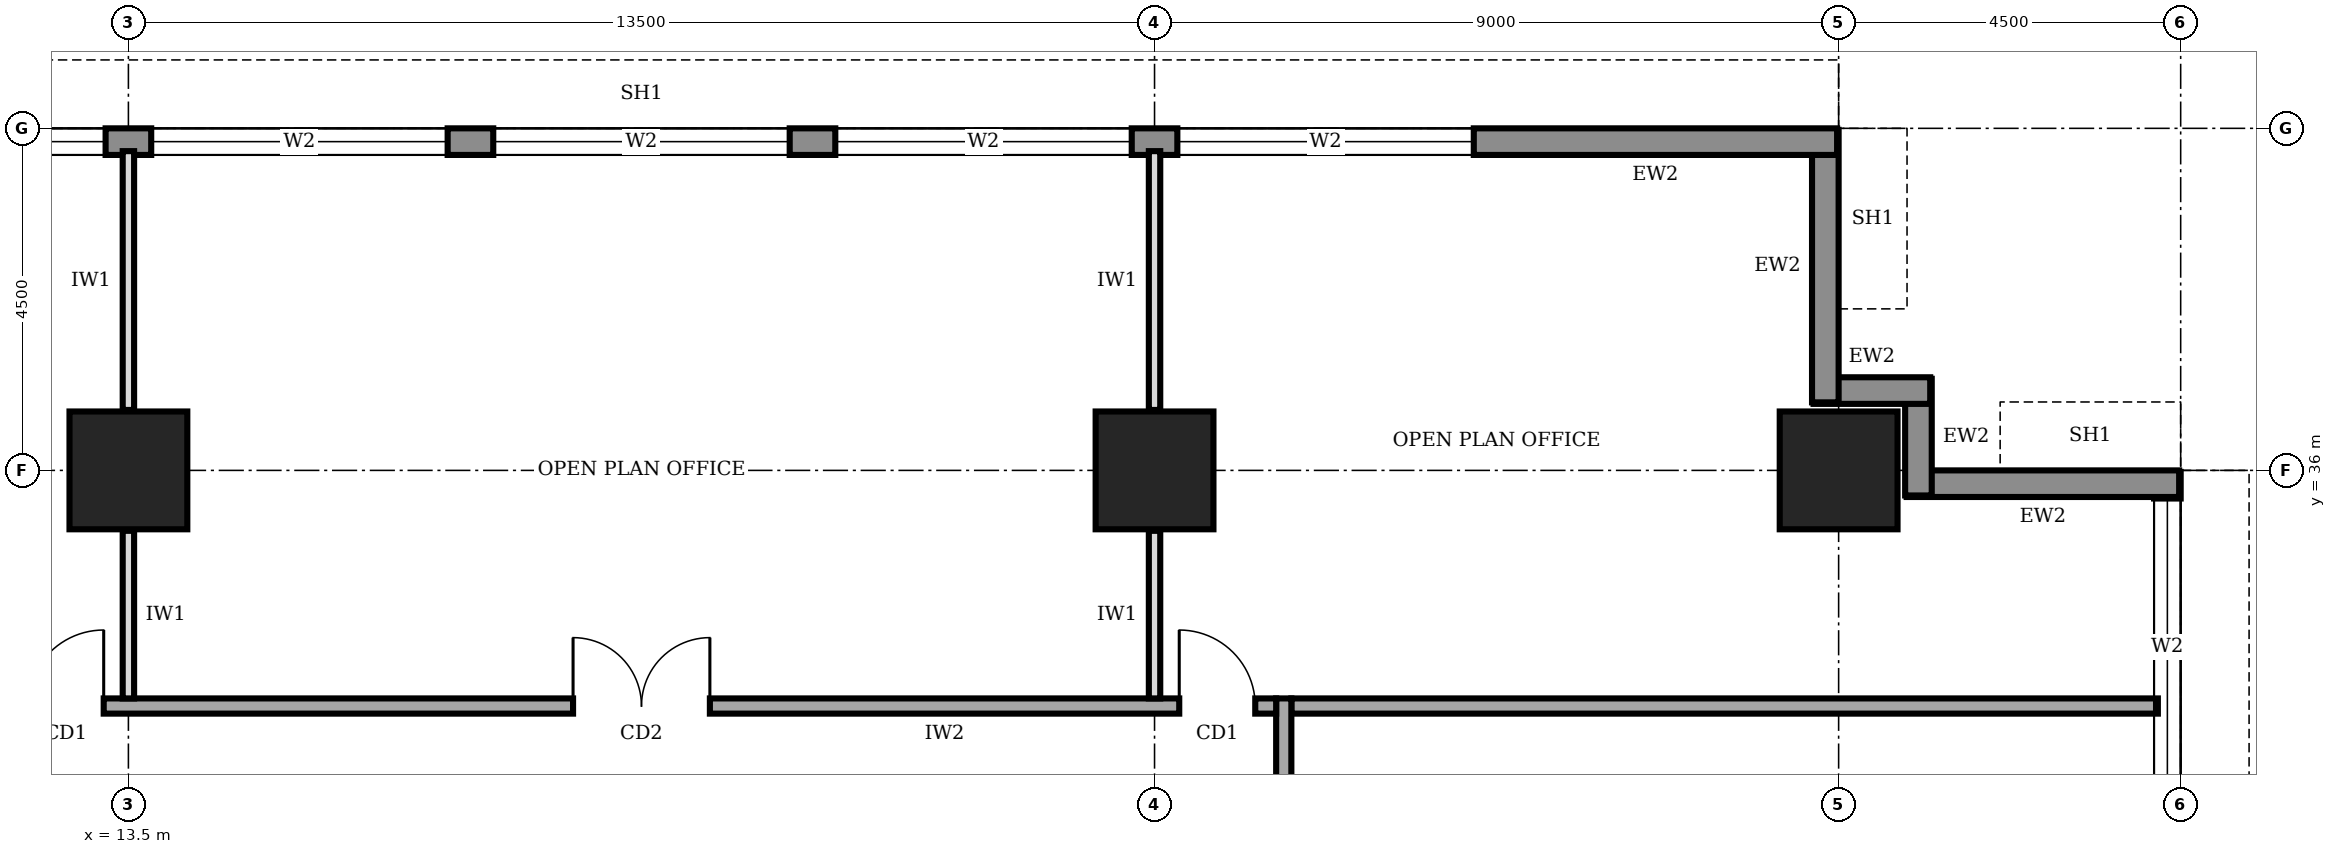
"""IFC4 building model, lengths in metres.
Left out: names, types, materials, properties, quantities, classifications, styles, units other than length and angle.
Written with IfcOpenShell. Run it as: python <this file> out.ifc"""

import sys

from ifc_helpers import new_model, si_unit, direction, frame, frame_2d, origin, origin_2d, place, context, subcontext, project, spatial, rectangle, extrude, element, fill, save


model = new_model("IFC4")
c1 = context("Model", 3, precision=1e-05, world=origin(), true_north=direction((0.0, 1.0)))
c2 = subcontext(c1, "Body", "Model", "MODEL_VIEW")
j1 = project(units=[si_unit("LENGTHUNIT", "METRE"), si_unit("PLANEANGLEUNIT", "RADIAN")], contexts=[c1])
p1 = place(None, origin())
s1 = spatial("IfcSite", under=j1, at=p1, CompositionType="ELEMENT")
p2 = place(p1, origin())
s2 = spatial("IfcBuilding", under=s1, at=p2, CompositionType="ELEMENT")
p3 = place(p2, frame((0.0, 0.0, 241.0)))
s3 = spatial("IfcBuildingStorey", under=s2, at=p3, CompositionType="ELEMENT", Elevation=241.0)
for number, where, z_axis, x_axis in (
    (1, (13.5, 36.0, 0.0), (0.0, 0.0, 1.0), (1.0, 0.0, 0.0)),
    (2, (27.0, 36.0, 0.0), (0.0, 0.0, 1.0), (1.0, 0.0, 0.0)),
    (3, (36.0, 36.0, 0.0), (0.0, 0.0, 1.0), (1.0, 0.0, 0.0)),
):
    element("IfcColumn", number, at=place(p3, frame(where, z_axis=z_axis, x_axis=x_axis)), inside=s3, PredefinedType="COLUMN", context=c2, shape_type="SweptSolid", body=[
        extrude(rectangle(XDim=1.55, YDim=1.55, at=origin_2d()), origin(), (0.0, 0.0, 1.0), 4.0),
    ])
p4 = place(p3, frame((40.325, 4.52, 0.0), z_axis=(0.0, 0.0, 1.0), x_axis=(0.0, 1.0, 0.0)))
e4 = element("IfcWall", 4, at=p4, inside=s3, PredefinedType="STANDARD", context=c2, shape_type="SweptSolid", body=[
    extrude(rectangle(XDim=31.46, YDim=0.35, at=frame_2d((15.73, 0.0))), origin(), (0.0, 0.0, 1.0), 3.75),
])
p5 = place(p4, frame((4.78, 0.0, 0.6)))
e5 = element("IfcOpeningElement", 5, at=p5, cuts=e4, PredefinedType="OPENING", context=c2, shape_type="SweptSolid", body=[
    extrude(rectangle(XDim=3.9, YDim=2.6, at=frame_2d((1.95, 1.3))), frame((0.0, 0.185, 0.0), z_axis=(0.0, -1.0, 0.0), x_axis=(1.0, 0.0, 0.0)), (0.0, 0.0, 1.0), 0.37),
])
p6 = place(p4, frame((9.28, 0.0, 0.6)))
e6 = element("IfcOpeningElement", 6, at=p6, cuts=e4, PredefinedType="OPENING", context=c2, shape_type="SweptSolid", body=[
    extrude(rectangle(XDim=3.9, YDim=2.6, at=frame_2d((1.95, 1.3))), frame((0.0, 0.185, 0.0), z_axis=(0.0, -1.0, 0.0), x_axis=(1.0, 0.0, 0.0)), (0.0, 0.0, 1.0), 0.37),
])
p7 = place(p4, frame((13.78, 0.0, 0.6)))
e7 = element("IfcOpeningElement", 7, at=p7, cuts=e4, PredefinedType="OPENING", context=c2, shape_type="SweptSolid", body=[
    extrude(rectangle(XDim=3.9, YDim=2.6, at=frame_2d((1.95, 1.3))), frame((0.0, 0.185, 0.0), z_axis=(0.0, -1.0, 0.0), x_axis=(1.0, 0.0, 0.0)), (0.0, 0.0, 1.0), 0.37),
])
p8 = place(p4, frame((18.28, 0.0, 0.6)))
e8 = element("IfcOpeningElement", 8, at=p8, cuts=e4, PredefinedType="OPENING", context=c2, shape_type="SweptSolid", body=[
    extrude(rectangle(XDim=3.9, YDim=2.6, at=frame_2d((1.95, 1.3))), frame((0.0, 0.185, 0.0), z_axis=(0.0, -1.0, 0.0), x_axis=(1.0, 0.0, 0.0)), (0.0, 0.0, 1.0), 0.37),
])
p9 = place(p4, frame((22.78, 0.0, 0.6)))
e9 = element("IfcOpeningElement", 9, at=p9, cuts=e4, PredefinedType="OPENING", context=c2, shape_type="SweptSolid", body=[
    extrude(rectangle(XDim=3.9, YDim=2.6, at=frame_2d((1.95, 1.3))), frame((0.0, 0.185, 0.0), z_axis=(0.0, -1.0, 0.0), x_axis=(1.0, 0.0, 0.0)), (0.0, 0.0, 1.0), 0.37),
])
p10 = place(p4, frame((27.21, 0.0, 0.6)))
e10 = element("IfcOpeningElement", 10, at=p10, cuts=e4, PredefinedType="OPENING", context=c2, shape_type="SweptSolid", body=[
    extrude(rectangle(XDim=3.9, YDim=2.6, at=frame_2d((1.95, 1.3))), frame((0.0, 0.185, 0.0), z_axis=(0.0, -1.0, 0.0), x_axis=(1.0, 0.0, 0.0)), (0.0, 0.0, 1.0), 0.37),
])
p11 = place(p3, frame((40.48, 35.825, 0.0), z_axis=(0.0, 0.0, 1.0), x_axis=(-1.0, 0.0, 0.0)))
e11 = element("IfcWall", 11, at=p11, inside=s3, PredefinedType="STANDARD", context=c2, shape_type="SweptSolid", body=[
    extrude(rectangle(XDim=3.585, YDim=0.35, at=frame_2d((1.792, 0.0))), origin(), (0.0, 0.0, 1.0), 2.75),
])
for number, where, z_axis, x_axis in (
    (12, (37.05, 35.67, 0.0), (0.0, 0.0, 1.0), (0.0, 1.0, 0.0)),
    (13, (37.205, 37.05, 0.0), (0.0, 0.0, 1.0), (-1.0, 0.0, 0.0)),
):
    element("IfcWall", number, at=place(p3, frame(where, z_axis=z_axis, x_axis=x_axis)), inside=s3, PredefinedType="STANDARD", context=c2, shape_type="SweptSolid", body=[
        extrude(rectangle(XDim=1.535, YDim=0.35, at=frame_2d((0.768, 0.0))), origin(), (0.0, 0.0, 1.0), 3.75),
    ])
p12 = place(p3, frame((35.825, 36.895, 0.0), z_axis=(0.0, 0.0, 1.0), x_axis=(0.0, 1.0, 0.0)))
e14 = element("IfcWall", 14, at=p12, inside=s3, PredefinedType="STANDARD", context=c2, shape_type="SweptSolid", body=[
    extrude(rectangle(XDim=3.585, YDim=0.35, at=frame_2d((1.792, 0.0))), origin(), (0.0, 0.0, 1.0), 2.75),
])
p13 = place(p3, frame((35.98, 40.325, 0.0), z_axis=(0.0, 0.0, 1.0), x_axis=(-1.0, 0.0, 0.0)))
e15 = element("IfcWall", 15, at=p13, inside=s3, PredefinedType="STANDARD", context=c2, shape_type="SweptSolid", body=[
    extrude(rectangle(XDim=31.46, YDim=0.35, at=frame_2d((15.73, 0.0))), origin(), (0.0, 0.0, 1.0), 3.75),
])
p14 = place(p13, frame((27.21, 0.0, 0.6)))
e16 = element("IfcOpeningElement", 16, at=p14, cuts=e15, PredefinedType="OPENING", context=c2, shape_type="SweptSolid", body=[
    extrude(rectangle(XDim=3.9, YDim=2.6, at=frame_2d((1.95, 1.3))), frame((0.0, 0.185, 0.0), z_axis=(0.0, -1.0, 0.0), x_axis=(1.0, 0.0, 0.0)), (0.0, 0.0, 1.0), 0.37),
])
p15 = place(p13, frame((22.78, 0.0, 0.6)))
e17 = element("IfcOpeningElement", 17, at=p15, cuts=e15, PredefinedType="OPENING", context=c2, shape_type="SweptSolid", body=[
    extrude(rectangle(XDim=3.9, YDim=2.6, at=frame_2d((1.95, 1.3))), frame((0.0, 0.185, 0.0), z_axis=(0.0, -1.0, 0.0), x_axis=(1.0, 0.0, 0.0)), (0.0, 0.0, 1.0), 0.37),
])
p16 = place(p13, frame((18.28, 0.0, 0.6)))
e18 = element("IfcOpeningElement", 18, at=p16, cuts=e15, PredefinedType="OPENING", context=c2, shape_type="SweptSolid", body=[
    extrude(rectangle(XDim=3.9, YDim=2.6, at=frame_2d((1.95, 1.3))), frame((0.0, 0.185, 0.0), z_axis=(0.0, -1.0, 0.0), x_axis=(1.0, 0.0, 0.0)), (0.0, 0.0, 1.0), 0.37),
])
p17 = place(p13, frame((13.78, 0.0, 0.6)))
e19 = element("IfcOpeningElement", 19, at=p17, cuts=e15, PredefinedType="OPENING", context=c2, shape_type="SweptSolid", body=[
    extrude(rectangle(XDim=3.9, YDim=2.6, at=frame_2d((1.95, 1.3))), frame((0.0, 0.185, 0.0), z_axis=(0.0, -1.0, 0.0), x_axis=(1.0, 0.0, 0.0)), (0.0, 0.0, 1.0), 0.37),
])
p18 = place(p13, frame((9.28, 0.0, 0.6)))
e20 = element("IfcOpeningElement", 20, at=p18, cuts=e15, PredefinedType="OPENING", context=c2, shape_type="SweptSolid", body=[
    extrude(rectangle(XDim=3.9, YDim=2.6, at=frame_2d((1.95, 1.3))), frame((0.0, 0.185, 0.0), z_axis=(0.0, -1.0, 0.0), x_axis=(1.0, 0.0, 0.0)), (0.0, 0.0, 1.0), 0.37),
])
p19 = place(p13, frame((4.78, 0.0, 0.6)))
e21 = element("IfcOpeningElement", 21, at=p19, cuts=e15, PredefinedType="OPENING", context=c2, shape_type="SweptSolid", body=[
    extrude(rectangle(XDim=3.9, YDim=2.6, at=frame_2d((1.95, 1.3))), frame((0.0, 0.185, 0.0), z_axis=(0.0, -1.0, 0.0), x_axis=(1.0, 0.0, 0.0)), (0.0, 0.0, 1.0), 0.37),
])
p20 = place(p3, frame((28.7, 7.7, 0.0), z_axis=(0.0, 0.0, 1.0), x_axis=(0.0, 1.0, 0.0)))
e22 = element("IfcWall", 22, at=p20, inside=s3, PredefinedType="SOLIDWALL", context=c2, shape_type="SweptSolid", body=[
    extrude(rectangle(XDim=25.3, YDim=0.2, at=frame_2d((12.65, 0.0))), origin(), (0.0, 0.0, 1.0), 3.75),
])
p21 = place(p20, frame((2.3, 0.0, 0.0)))
e23 = element("IfcOpeningElement", 23, at=p21, cuts=e22, PredefinedType="OPENING", context=c2, shape_type="SweptSolid", body=[
    extrude(rectangle(XDim=1.0, YDim=2.1, at=frame_2d((0.5, 1.05))), frame((0.0, 0.11, 0.0), z_axis=(0.0, -1.0, 0.0), x_axis=(1.0, 0.0, 0.0)), (0.0, 0.0, 1.0), 0.22),
])
p22 = place(p20, frame((7.55, 0.0, 0.0)))
e24 = element("IfcOpeningElement", 24, at=p22, cuts=e22, PredefinedType="OPENING", context=c2, shape_type="SweptSolid", body=[
    extrude(rectangle(XDim=1.0, YDim=2.1, at=frame_2d((0.5, 1.05))), frame((0.0, 0.11, 0.0), z_axis=(0.0, -1.0, 0.0), x_axis=(1.0, 0.0, 0.0)), (0.0, 0.0, 1.0), 0.22),
])
p23 = place(p20, frame((16.9, 0.0, 0.0)))
e25 = element("IfcOpeningElement", 25, at=p23, cuts=e22, PredefinedType="OPENING", context=c2, shape_type="SweptSolid", body=[
    extrude(rectangle(XDim=1.8, YDim=2.1, at=frame_2d((0.9, 1.05))), frame((0.0, 0.11, 0.0), z_axis=(0.0, -1.0, 0.0), x_axis=(1.0, 0.0, 0.0)), (0.0, 0.0, 1.0), 0.22),
])
p24 = place(p3, frame((28.6, 32.9, 0.0), z_axis=(0.0, 0.0, 1.0), x_axis=(-1.0, 0.0, 0.0)))
e26 = element("IfcWall", 26, at=p24, inside=s3, PredefinedType="SOLIDWALL", context=c2, shape_type="SweptSolid", body=[
    extrude(rectangle(XDim=16.9, YDim=0.2, at=frame_2d((8.45, 0.0))), origin(), (0.0, 0.0, 1.0), 3.75),
])
p25 = place(p24, frame((15.425, 0.0, 0.0)))
e27 = element("IfcOpeningElement", 27, at=p25, cuts=e26, PredefinedType="OPENING", context=c2, shape_type="SweptSolid", body=[
    extrude(rectangle(XDim=1.0, YDim=2.1, at=frame_2d((0.5, 1.05))), frame((0.0, 0.11, 0.0), z_axis=(0.0, -1.0, 0.0), x_axis=(1.0, 0.0, 0.0)), (0.0, 0.0, 1.0), 0.22),
])
p26 = place(p24, frame((7.45, 0.0, 0.0)))
e28 = element("IfcOpeningElement", 28, at=p26, cuts=e26, PredefinedType="OPENING", context=c2, shape_type="SweptSolid", body=[
    extrude(rectangle(XDim=1.8, YDim=2.1, at=frame_2d((0.9, 1.05))), frame((0.0, 0.11, 0.0), z_axis=(0.0, -1.0, 0.0), x_axis=(1.0, 0.0, 0.0)), (0.0, 0.0, 1.0), 0.22),
])
p27 = place(p24, frame((0.275, 0.0, 0.0)))
e29 = element("IfcOpeningElement", 29, at=p27, cuts=e26, PredefinedType="OPENING", context=c2, shape_type="SweptSolid", body=[
    extrude(rectangle(XDim=1.0, YDim=2.1, at=frame_2d((0.5, 1.05))), frame((0.0, 0.11, 0.0), z_axis=(0.0, -1.0, 0.0), x_axis=(1.0, 0.0, 0.0)), (0.0, 0.0, 1.0), 0.22),
])
p28 = place(p3, frame((28.8, 32.9, 0.0), z_axis=(0.0, 0.0, 1.0), x_axis=(1.0, 0.0, 0.0)))
e30 = element("IfcWall", 30, at=p28, inside=s3, PredefinedType="SOLIDWALL", context=c2, shape_type="SweptSolid", body=[
    extrude(rectangle(XDim=11.4, YDim=0.2, at=frame_2d((5.7, 0.0))), origin(), (0.0, 0.0, 1.0), 3.75),
])
p29 = place(p3, frame((13.5, 33.0, 0.0), z_axis=(0.0, 0.0, 1.0), x_axis=(0.0, 1.0, 0.0)))
e31 = element("IfcWall", 31, at=p29, inside=s3, PredefinedType="PARTITIONING", context=c2, shape_type="SweptSolid", body=[
    extrude(rectangle(XDim=2.205, YDim=0.15, at=frame_2d((1.103, 0.0))), origin(), (0.0, 0.0, 1.0), 3.75),
])
p30 = place(p3, frame((13.5, 36.795, 0.0), z_axis=(0.0, 0.0, 1.0), x_axis=(0.0, 1.0, 0.0)))
e32 = element("IfcWall", 32, at=p30, inside=s3, PredefinedType="PARTITIONING", context=c2, shape_type="SweptSolid", body=[
    extrude(rectangle(XDim=3.405, YDim=0.15, at=frame_2d((1.703, 0.0))), origin(), (0.0, 0.0, 1.0), 2.75),
])
p31 = place(p3, frame((27.0, 33.0, 0.0), z_axis=(0.0, 0.0, 1.0), x_axis=(0.0, 1.0, 0.0)))
e33 = element("IfcWall", 33, at=p31, inside=s3, PredefinedType="PARTITIONING", context=c2, shape_type="SweptSolid", body=[
    extrude(rectangle(XDim=2.205, YDim=0.15, at=frame_2d((1.103, 0.0))), origin(), (0.0, 0.0, 1.0), 3.75),
])
p32 = place(p3, frame((27.0, 36.795, 0.0), z_axis=(0.0, 0.0, 1.0), x_axis=(0.0, 1.0, 0.0)))
e34 = element("IfcWall", 34, at=p32, inside=s3, PredefinedType="PARTITIONING", context=c2, shape_type="SweptSolid", body=[
    extrude(rectangle(XDim=3.405, YDim=0.15, at=frame_2d((1.703, 0.0))), origin(), (0.0, 0.0, 1.0), 2.75),
])
p33 = place(p10, origin())
e35 = element("IfcWindow", 35, at=p33, inside=s3, PartitioningType="SINGLE_PANEL", PredefinedType="WINDOW", context=c2, shape_type="SweptSolid", body=[
    extrude(rectangle(XDim=3.9, YDim=2.6, at=frame_2d((1.95, 1.3))), frame((0.0, 0.03, 0.0), z_axis=(0.0, -1.0, 0.0), x_axis=(1.0, 0.0, 0.0)), (0.0, 0.0, 1.0), 0.06),
])
fill(e10, e35)
p34 = place(p15, origin())
e36 = element("IfcWindow", 36, at=p34, inside=s3, PartitioningType="SINGLE_PANEL", PredefinedType="WINDOW", context=c2, shape_type="SweptSolid", body=[
    extrude(rectangle(XDim=3.9, YDim=2.6, at=frame_2d((1.95, 1.3))), frame((0.0, 0.03, 0.0), z_axis=(0.0, -1.0, 0.0), x_axis=(1.0, 0.0, 0.0)), (0.0, 0.0, 1.0), 0.06),
])
fill(e17, e36)
p35 = place(p16, origin())
e37 = element("IfcWindow", 37, at=p35, inside=s3, PartitioningType="SINGLE_PANEL", PredefinedType="WINDOW", context=c2, shape_type="SweptSolid", body=[
    extrude(rectangle(XDim=3.9, YDim=2.6, at=frame_2d((1.95, 1.3))), frame((0.0, 0.03, 0.0), z_axis=(0.0, -1.0, 0.0), x_axis=(1.0, 0.0, 0.0)), (0.0, 0.0, 1.0), 0.06),
])
fill(e18, e37)
p36 = place(p17, origin())
e38 = element("IfcWindow", 38, at=p36, inside=s3, PartitioningType="SINGLE_PANEL", PredefinedType="WINDOW", context=c2, shape_type="SweptSolid", body=[
    extrude(rectangle(XDim=3.9, YDim=2.6, at=frame_2d((1.95, 1.3))), frame((0.0, 0.03, 0.0), z_axis=(0.0, -1.0, 0.0), x_axis=(1.0, 0.0, 0.0)), (0.0, 0.0, 1.0), 0.06),
])
fill(e19, e38)
p37 = place(p18, origin())
e39 = element("IfcWindow", 39, at=p37, inside=s3, PartitioningType="SINGLE_PANEL", PredefinedType="WINDOW", context=c2, shape_type="SweptSolid", body=[
    extrude(rectangle(XDim=3.9, YDim=2.6, at=frame_2d((1.95, 1.3))), frame((0.0, 0.03, 0.0), z_axis=(0.0, -1.0, 0.0), x_axis=(1.0, 0.0, 0.0)), (0.0, 0.0, 1.0), 0.06),
])
fill(e20, e39)
p38 = place(p19, origin())
e40 = element("IfcWindow", 40, at=p38, inside=s3, PartitioningType="SINGLE_PANEL", PredefinedType="WINDOW", context=c2, shape_type="SweptSolid", body=[
    extrude(rectangle(XDim=3.9, YDim=2.6, at=frame_2d((1.95, 1.3))), frame((0.0, 0.03, 0.0), z_axis=(0.0, -1.0, 0.0), x_axis=(1.0, 0.0, 0.0)), (0.0, 0.0, 1.0), 0.06),
])
fill(e21, e40)
p39 = place(p25, frame((1.0, 0.0, 0.0), z_axis=(0.0, 0.0, 1.0), x_axis=(-1.0, 0.0, 0.0)))
e41 = element("IfcDoor", 41, at=p39, inside=s3, OperationType="SINGLE_SWING_RIGHT", PredefinedType="DOOR", context=c2, shape_type="SweptSolid", body=[
    extrude(rectangle(XDim=1.0, YDim=2.1, at=frame_2d((0.5, 1.05))), frame((0.0, 0.025, 0.0), z_axis=(0.0, -1.0, 0.0), x_axis=(1.0, 0.0, 0.0)), (0.0, 0.0, 1.0), 0.05),
])
fill(e27, e41)
p40 = place(p26, frame((1.8, 0.0, 0.0), z_axis=(0.0, 0.0, 1.0), x_axis=(-1.0, 0.0, 0.0)))
e42 = element("IfcDoor", 42, at=p40, inside=s3, OperationType="DOUBLE_DOOR_SINGLE_SWING", PredefinedType="DOOR", context=c2, shape_type="SweptSolid", body=[
    extrude(rectangle(XDim=1.8, YDim=2.1, at=frame_2d((0.9, 1.05))), frame((0.0, 0.025, 0.0), z_axis=(0.0, -1.0, 0.0), x_axis=(1.0, 0.0, 0.0)), (0.0, 0.0, 1.0), 0.05),
])
fill(e28, e42)
p41 = place(p27, frame((1.0, 0.0, 0.0), z_axis=(0.0, 0.0, 1.0), x_axis=(-1.0, 0.0, 0.0)))
e43 = element("IfcDoor", 43, at=p41, inside=s3, OperationType="SINGLE_SWING_LEFT", PredefinedType="DOOR", context=c2, shape_type="SweptSolid", body=[
    extrude(rectangle(XDim=1.0, YDim=2.1, at=frame_2d((0.5, 1.05))), frame((0.0, 0.025, 0.0), z_axis=(0.0, -1.0, 0.0), x_axis=(1.0, 0.0, 0.0)), (0.0, 0.0, 1.0), 0.05),
])
fill(e29, e43)
save(model, sys.argv[1])
